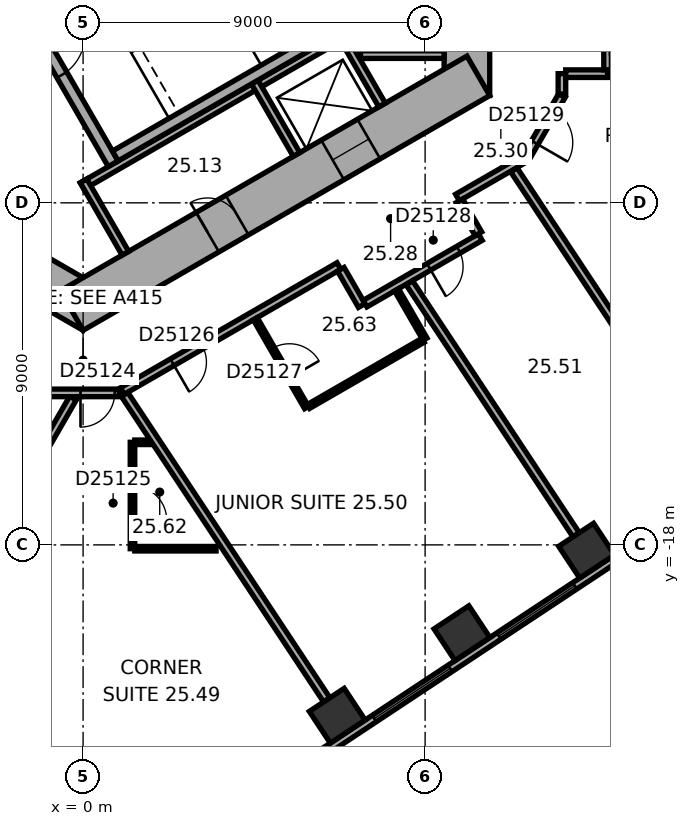
"""IFC4 building model, lengths in metres.
Left out: names, types, materials, properties, quantities, classifications, styles, units other than length and angle.
Written with IfcOpenShell. Run it as: python <this file> out.ifc"""

import sys

from ifc_helpers import new_model, si_unit, direction, frame, frame_2d, origin, origin_2d, place, context, subcontext, project, spatial, rectangle, extrude, element, fill, save


model = new_model("IFC4")
c1 = context("Model", 3, precision=1e-05, world=origin(), true_north=direction((0.0, 1.0)))
c2 = subcontext(c1, "Body", "Model", "MODEL_VIEW")
j1 = project(units=[si_unit("LENGTHUNIT", "METRE"), si_unit("PLANEANGLEUNIT", "RADIAN")], contexts=[c1])
p1 = place(None, origin())
s1 = spatial("IfcSite", under=j1, at=p1, CompositionType="ELEMENT")
p2 = place(p1, origin())
s2 = spatial("IfcBuilding", under=s1, at=p2, CompositionType="ELEMENT")
p3 = place(p2, frame((0.0, 0.0, 106.7)))
s3 = spatial("IfcBuildingStorey", under=s2, at=p3, CompositionType="ELEMENT", Elevation=106.7)
for number, where, z_axis, x_axis in (
    (1, (6.688, -22.496, 0.0), (0.0, 0.0, 1.0), (0.834, 0.552, 0.0)),
    (2, (9.969, -20.324, 0.0), (0.0, 0.0, 1.0), (0.834, 0.552, 0.0)),
    (3, (13.25, -18.152, 0.0), (0.0, 0.0, 1.0), (0.834, 0.552, 0.0)),
):
    element("IfcColumn", number, at=place(p3, frame(where, z_axis=z_axis, x_axis=x_axis)), inside=s3, PredefinedType="COLUMN", context=c2, shape_type="SweptSolid", body=[
        extrude(rectangle(XDim=1.1, YDim=1.0, at=origin_2d()), origin(), (0.0, 0.0, 1.0), 3.3),
    ])
p4 = place(p3, frame((10.1, -6.177, 0.0), z_axis=(0.0, 0.0, 1.0), x_axis=(0.0, 1.0, 0.0)))
e4 = element("IfcWall", 4, at=p4, inside=s3, PredefinedType="SHEAR", context=c2, shape_type="SweptSolid", body=[
    extrude(rectangle(XDim=12.355, YDim=1.2, at=frame_2d((6.177, 0.0))), origin(), (0.0, 0.0, 1.0), 3.3),
])
p5 = place(p4, frame((6.378, 0.0, 0.0)))
e5 = element("IfcOpeningElement", 5, at=p5, cuts=e4, PredefinedType="OPENING", context=c2, shape_type="SweptSolid", body=[
    extrude(rectangle(XDim=1.5, YDim=2.1, at=frame_2d((0.75, 1.05))), frame((0.0, 0.61, 0.0), z_axis=(0.0, -1.0, 0.0), x_axis=(1.0, 0.0, 0.0)), (0.0, 0.0, 1.0), 1.22),
])
p6 = place(p4, frame((1.828, 0.0, 0.0)))
e6 = element("IfcOpeningElement", 6, at=p6, cuts=e4, PredefinedType="OPENING", context=c2, shape_type="SweptSolid", body=[
    extrude(rectangle(XDim=1.1, YDim=2.1, at=frame_2d((0.55, 1.05))), frame((0.0, 0.61, 0.0), z_axis=(0.0, -1.0, 0.0), x_axis=(1.0, 0.0, 0.0)), (0.0, 0.0, 1.0), 1.22),
])
p7 = place(p4, frame((4.427, 0.0, 0.0)))
e7 = element("IfcOpeningElement", 7, at=p7, cuts=e4, PredefinedType="OPENING", context=c2, shape_type="SweptSolid", body=[
    extrude(rectangle(XDim=1.1, YDim=2.1, at=frame_2d((0.55, 1.05))), frame((0.0, 0.61, 0.0), z_axis=(0.0, -1.0, 0.0), x_axis=(1.0, 0.0, 0.0)), (0.0, 0.0, 1.0), 1.22),
])
p8 = place(p3, frame((-10.4, -5.658, 0.0), z_axis=(0.0, 0.0, 1.0), x_axis=(0.866021384402, -0.500006961711, 0.0)))
e8 = element("IfcWall", 8, at=p8, inside=s3, PredefinedType="SHEAR", context=c2, shape_type="SweptSolid", body=[
    extrude(rectangle(XDim=12.355, YDim=1.2, at=frame_2d((6.178, 0.0))), origin(), (0.0, 0.0, 1.0), 3.3),
])
p9 = place(p8, frame((6.378, 0.0, 0.0)))
e9 = element("IfcOpeningElement", 9, at=p9, cuts=e8, PredefinedType="OPENING", context=c2, shape_type="SweptSolid", body=[
    extrude(rectangle(XDim=1.5, YDim=2.1, at=frame_2d((0.75, 1.05))), frame((0.0, 0.61, 0.0), z_axis=(0.0, -1.0, 0.0), x_axis=(1.0, 0.0, 0.0)), (0.0, 0.0, 1.0), 1.22),
])
p10 = place(p8, frame((1.928, 0.0, 0.0)))
e10 = element("IfcOpeningElement", 10, at=p10, cuts=e8, PredefinedType="OPENING", context=c2, shape_type="SweptSolid", body=[
    extrude(rectangle(XDim=0.9, YDim=2.1, at=frame_2d((0.45, 1.05))), frame((0.0, 0.61, 0.0), z_axis=(0.0, -1.0, 0.0), x_axis=(1.0, 0.0, 0.0)), (0.0, 0.0, 1.0), 1.22),
])
p11 = place(p8, frame((4.528, 0.0, 0.0)))
e11 = element("IfcOpeningElement", 11, at=p11, cuts=e8, PredefinedType="OPENING", context=c2, shape_type="SweptSolid", body=[
    extrude(rectangle(XDim=0.9, YDim=2.1, at=frame_2d((0.45, 1.05))), frame((0.0, 0.61, 0.0), z_axis=(0.0, -1.0, 0.0), x_axis=(1.0, 0.0, 0.0)), (0.0, 0.0, 1.0), 1.22),
])
p12 = place(p3, frame((-0.3, -11.836, 0.0), z_axis=(0.0, 0.0, 1.0), x_axis=(0.866021384402, 0.500006961711, 0.0)))
e12 = element("IfcWall", 12, at=p12, inside=s3, PredefinedType="SHEAR", context=c2, shape_type="SweptSolid", body=[
    extrude(rectangle(XDim=12.355, YDim=1.2, at=frame_2d((6.178, 0.0))), origin(), (0.0, 0.0, 1.0), 3.3),
])
p13 = place(p12, frame((4.128, 0.0, 0.0)))
e13 = element("IfcOpeningElement", 13, at=p13, cuts=e12, PredefinedType="OPENING", context=c2, shape_type="SweptSolid", body=[
    extrude(rectangle(XDim=0.9, YDim=2.1, at=frame_2d((0.45, 1.05))), frame((0.0, 0.61, 0.0), z_axis=(0.0, -1.0, 0.0), x_axis=(1.0, 0.0, 0.0)), (0.0, 0.0, 1.0), 1.22),
])
p14 = place(p12, frame((7.928, 0.0, 0.0)))
e14 = element("IfcOpeningElement", 14, at=p14, cuts=e12, PredefinedType="OPENING", context=c2, shape_type="SweptSolid", body=[
    extrude(rectangle(XDim=1.1, YDim=2.1, at=frame_2d((0.55, 1.05))), frame((0.0, 0.61, 0.0), z_axis=(0.0, -1.0, 0.0), x_axis=(1.0, 0.0, 0.0)), (0.0, 0.0, 1.0), 1.22),
])
p15 = place(p3, frame((3.083, -25.601, 0.0), z_axis=(0.0, 0.0, 1.0), x_axis=(0.833884295743, 0.551939291329, 0.0)))
e15 = element("IfcWall", 15, at=p15, inside=s3, PredefinedType="STANDARD", context=c2, shape_type="SweptSolid", body=[
    extrude(rectangle(XDim=21.246, YDim=0.2, at=frame_2d((10.623, 0.0))), origin(), (0.0, 0.0, 1.0), 3.3),
])
p16 = place(p15, frame((1.553, 0.0, 0.8)))
e16 = element("IfcOpeningElement", 16, at=p16, cuts=e15, PredefinedType="OPENING", context=c2, shape_type="SweptSolid", body=[
    extrude(rectangle(XDim=2.4, YDim=1.7, at=frame_2d((1.2, 0.85))), frame((0.0, 0.11, 0.0), z_axis=(0.0, -1.0, 0.0), x_axis=(1.0, 0.0, 0.0)), (0.0, 0.0, 1.0), 0.22),
])
p17 = place(p15, frame((5.488, 0.0, 0.8)))
e17 = element("IfcOpeningElement", 17, at=p17, cuts=e15, PredefinedType="OPENING", context=c2, shape_type="SweptSolid", body=[
    extrude(rectangle(XDim=2.4, YDim=1.7, at=frame_2d((1.2, 0.85))), frame((0.0, 0.11, 0.0), z_axis=(0.0, -1.0, 0.0), x_axis=(1.0, 0.0, 0.0)), (0.0, 0.0, 1.0), 0.22),
])
p18 = place(p15, frame((9.422, 0.0, 0.8)))
e18 = element("IfcOpeningElement", 18, at=p18, cuts=e15, PredefinedType="OPENING", context=c2, shape_type="SweptSolid", body=[
    extrude(rectangle(XDim=2.4, YDim=1.7, at=frame_2d((1.2, 0.85))), frame((0.0, 0.11, 0.0), z_axis=(0.0, -1.0, 0.0), x_axis=(1.0, 0.0, 0.0)), (0.0, 0.0, 1.0), 0.22),
])
p19 = place(p15, frame((13.357, 0.0, 0.8)))
e19 = element("IfcOpeningElement", 19, at=p19, cuts=e15, PredefinedType="OPENING", context=c2, shape_type="SweptSolid", body=[
    extrude(rectangle(XDim=2.4, YDim=1.7, at=frame_2d((1.2, 0.85))), frame((0.0, 0.11, 0.0), z_axis=(0.0, -1.0, 0.0), x_axis=(1.0, 0.0, 0.0)), (0.0, 0.0, 1.0), 0.22),
])
p20 = place(p15, frame((17.291, 0.0, 0.8)))
e20 = element("IfcOpeningElement", 20, at=p20, cuts=e15, PredefinedType="OPENING", context=c2, shape_type="SweptSolid", body=[
    extrude(rectangle(XDim=2.4, YDim=1.7, at=frame_2d((1.2, 0.85))), frame((0.0, 0.11, 0.0), z_axis=(0.0, -1.0, 0.0), x_axis=(1.0, 0.0, 0.0)), (0.0, 0.0, 1.0), 0.22),
])
p21 = place(p3, frame((7.4, -5.2, 0.0), z_axis=(0.0, 0.0, 1.0), x_axis=(0.0, 1.0, 0.0)))
e21 = element("IfcWall", 21, at=p21, inside=s3, PredefinedType="PARTITIONING", context=c2, shape_type="SweptSolid", body=[
    extrude(rectangle(XDim=5.4, YDim=0.2, at=frame_2d((2.7, 0.0))), origin(), (0.0, 0.0, 1.0), 3.05),
])
p22 = place(p3, frame((7.3, -5.1, 0.0), z_axis=(0.0, 0.0, 1.0), x_axis=(1.0, 0.0, 0.0)))
e22 = element("IfcWall", 22, at=p22, inside=s3, PredefinedType="PARTITIONING", context=c2, shape_type="SweptSolid", body=[
    extrude(rectangle(XDim=2.2, YDim=0.2, at=frame_2d((1.1, 0.0))), origin(), (0.0, 0.0, 1.0), 3.05),
])
p23 = place(p3, frame((-0.024, -8.559, 0.0), z_axis=(0.0, 0.0, 1.0), x_axis=(0.866026010844, 0.49999894854, 0.0)))
e23 = element("IfcWall", 23, at=p23, inside=s3, PredefinedType="PARTITIONING", context=c2, shape_type="SweptSolid", body=[
    extrude(rectangle(XDim=8.0, YDim=0.2, at=frame_2d((4.0, 0.0))), origin(), (0.0, 0.0, 1.0), 3.05),
])
for number, where, z_axis, x_axis in (
    (24, (0.013, -8.422, 0.0), (0.0, 0.0, 1.0), (0.5, -0.866, 0.0)),
    (25, (4.516, -5.822, 0.0), (0.0, 0.0, 1.0), (0.5, -0.866, 0.0)),
    (26, (6.768, -4.522, 0.0), (0.0, 0.0, 1.0), (0.5, -0.866, 0.0)),
):
    element("IfcWall", number, at=place(p3, frame(where, z_axis=z_axis, x_axis=x_axis)), inside=s3, PredefinedType="PARTITIONING", context=c2, shape_type="SweptSolid", body=[
        extrude(rectangle(XDim=2.2, YDim=0.2, at=frame_2d((1.1, 0.0))), origin(), (0.0, 0.0, 1.0), 3.05),
    ])
p24 = place(p3, frame((-1.558, -3.902, 0.0), z_axis=(0.0, 0.0, 1.0), x_axis=(0.499977259774, -0.866038532462, 0.0)))
e27 = element("IfcWall", 27, at=p24, inside=s3, PredefinedType="SHEAR", context=c2, shape_type="SweptSolid", body=[
    extrude(rectangle(XDim=4.7, YDim=0.3, at=frame_2d((2.35, 0.0))), origin(), (0.0, 0.0, 1.0), 3.05),
])
p25 = place(p24, frame((0.8, 0.0, 0.0)))
e28 = element("IfcOpeningElement", 28, at=p25, cuts=e27, PredefinedType="OPENING", context=c2, shape_type="SweptSolid", body=[
    extrude(rectangle(XDim=1.2, YDim=2.1, at=frame_2d((0.6, 1.05))), frame((0.0, 0.16, 0.0), z_axis=(0.0, -1.0, 0.0), x_axis=(1.0, 0.0, 0.0)), (0.0, 0.0, 1.0), 0.32),
])
p26 = place(p3, frame((0.847, -7.767, 0.0), z_axis=(0.0, 0.0, 1.0), x_axis=(0.866027801685, 0.499995846692, 0.0)))
e29 = element("IfcWall", 29, at=p26, inside=s3, PredefinedType="SHEAR", context=c2, shape_type="SweptSolid", body=[
    extrude(rectangle(XDim=7.06, YDim=0.3, at=frame_2d((3.53, 0.0))), origin(), (0.0, 0.0, 1.0), 3.05),
])
p27 = place(p3, frame((-5.052, -22.429, 0.0), z_axis=(0.0, 0.0, 1.0), x_axis=(0.500004329283, 0.866022904257, 0.0)))
e30 = element("IfcWall", 30, at=p27, inside=s3, PredefinedType="PARTITIONING", context=c2, shape_type="SweptSolid", body=[
    extrude(rectangle(XDim=9.572, YDim=0.2, at=frame_2d((4.786, 0.0))), origin(), (0.0, 0.0, 1.0), 3.05),
])
p28 = place(p3, frame((-0.91, -14.001, 0.0), z_axis=(0.0, 0.0, 1.0), x_axis=(1.0, 0.0, 0.0)))
e31 = element("IfcWall", 31, at=p28, inside=s3, PredefinedType="PARTITIONING", context=c2, shape_type="SweptSolid", body=[
    extrude(rectangle(XDim=1.86, YDim=0.2, at=frame_2d((0.93, 0.0))), origin(), (0.0, 0.0, 1.0), 3.05),
])
p29 = place(p28, frame((0.842, 0.0, 0.0)))
e32 = element("IfcOpeningElement", 32, at=p29, cuts=e31, PredefinedType="OPENING", context=c2, shape_type="SweptSolid", body=[
    extrude(rectangle(XDim=0.9, YDim=2.1, at=frame_2d((0.45, 1.05))), frame((0.0, 0.11, 0.0), z_axis=(0.0, -1.0, 0.0), x_axis=(1.0, 0.0, 0.0)), (0.0, 0.0, 1.0), 0.22),
])
p30 = place(p3, frame((1.033, -13.953, 0.0), z_axis=(0.0, 0.0, 1.0), x_axis=(0.866017531406, 0.500013635111, 0.0)))
e33 = element("IfcWall", 33, at=p30, inside=s3, PredefinedType="PARTITIONING", context=c2, shape_type="SweptSolid", body=[
    extrude(rectangle(XDim=6.58, YDim=0.2, at=frame_2d((3.29, 0.0))), origin(), (0.0, 0.0, 1.0), 3.05),
])
p31 = place(p30, frame((1.515, 0.0, 0.0)))
e34 = element("IfcOpeningElement", 34, at=p31, cuts=e33, PredefinedType="OPENING", context=c2, shape_type="SweptSolid", body=[
    extrude(rectangle(XDim=0.9, YDim=2.1, at=frame_2d((0.45, 1.05))), frame((0.0, 0.11, 0.0), z_axis=(0.0, -1.0, 0.0), x_axis=(1.0, 0.0, 0.0)), (0.0, 0.0, 1.0), 0.22),
])
p32 = place(p3, frame((1.3, -18.101, 0.0), z_axis=(0.0, 0.0, 1.0), x_axis=(0.0, 1.0, 0.0)))
e35 = element("IfcWall", 35, at=p32, inside=s3, PredefinedType="PARTITIONING", context=c2, shape_type="SweptSolid", body=[
    extrude(rectangle(XDim=2.8, YDim=0.12, at=frame_2d((1.4, 0.0))), origin(), (0.0, 0.0, 1.0), 3.05),
])
p33 = place(p32, frame((0.75, 0.0, 0.0)))
e36 = element("IfcOpeningElement", 36, at=p33, cuts=e35, PredefinedType="OPENING", context=c2, shape_type="SweptSolid", body=[
    extrude(rectangle(XDim=0.9, YDim=2.1, at=frame_2d((0.45, 1.05))), frame((0.0, 0.07, 0.0), z_axis=(0.0, -1.0, 0.0), x_axis=(1.0, 0.0, 0.0)), (0.0, 0.0, 1.0), 0.14),
])
p34 = place(p3, frame((1.36, -15.301, 0.0), z_axis=(0.0, 0.0, 1.0), x_axis=(1.0, 0.0, 0.0)))
e37 = element("IfcWall", 37, at=p34, inside=s3, PredefinedType="PARTITIONING", context=c2, shape_type="SweptSolid", body=[
    extrude(rectangle(XDim=0.416, YDim=0.12, at=frame_2d((0.208, 0.0))), origin(), (0.0, 0.0, 1.0), 3.05),
])
p35 = place(p3, frame((3.5, -18.101, 0.0), z_axis=(0.0, 0.0, 1.0), x_axis=(-1.0, 0.0, 0.0)))
e38 = element("IfcWall", 38, at=p35, inside=s3, PredefinedType="PARTITIONING", context=c2, shape_type="SweptSolid", body=[
    extrude(rectangle(XDim=2.14, YDim=0.12, at=frame_2d((1.07, 0.0))), origin(), (0.0, 0.0, 1.0), 3.05),
])
p36 = place(p3, frame((5.881, -14.387, 0.0), z_axis=(0.0, 0.0, 1.0), x_axis=(-0.500048589285, 0.86599734893, 0.0)))
e39 = element("IfcWall", 39, at=p36, inside=s3, PredefinedType="PARTITIONING", context=c2, shape_type="SweptSolid", body=[
    extrude(rectangle(XDim=2.7, YDim=0.12, at=frame_2d((1.35, 0.0))), origin(), (0.0, 0.0, 1.0), 3.05),
])
p37 = place(p36, frame((0.9, 0.0, 0.0)))
e40 = element("IfcOpeningElement", 40, at=p37, cuts=e39, PredefinedType="OPENING", context=c2, shape_type="SweptSolid", body=[
    extrude(rectangle(XDim=0.9, YDim=2.1, at=frame_2d((0.45, 1.05))), frame((0.0, 0.07, 0.0), z_axis=(0.0, -1.0, 0.0), x_axis=(1.0, 0.0, 0.0)), (0.0, 0.0, 1.0), 0.14),
])
p38 = place(p3, frame((6.412, -22.079, 0.0), z_axis=(0.0, 0.0, 1.0), x_axis=(-0.551919507115, 0.83389739037, 0.0)))
e41 = element("IfcWall", 41, at=p38, inside=s3, PredefinedType="PARTITIONING", context=c2, shape_type="SweptSolid", body=[
    extrude(rectangle(XDim=9.635, YDim=0.2, at=frame_2d((4.817, 0.0))), origin(), (0.0, 0.0, 1.0), 3.05),
])
p39 = place(p3, frame((6.782, -10.749, 0.0), z_axis=(0.0, 0.0, 1.0), x_axis=(0.500074377092, -0.865982457891, 0.0)))
e42 = element("IfcWall", 42, at=p39, inside=s3, PredefinedType="PARTITIONING", context=c2, shape_type="SweptSolid", body=[
    extrude(rectangle(XDim=1.101, YDim=0.2, at=frame_2d((0.55, 0.0))), origin(), (0.0, 0.0, 1.0), 3.05),
])
p40 = place(p3, frame((7.419, -11.653, 0.0), z_axis=(0.0, 0.0, 1.0), x_axis=(0.866038154057, 0.49997791523, 0.0)))
e43 = element("IfcWall", 43, at=p40, inside=s3, PredefinedType="PARTITIONING", context=c2, shape_type="SweptSolid", body=[
    extrude(rectangle(XDim=3.502, YDim=0.2, at=frame_2d((1.751, 0.0))), origin(), (0.0, 0.0, 1.0), 3.05),
])
p41 = place(p40, frame((1.94, 0.0, 0.0)))
e44 = element("IfcOpeningElement", 44, at=p41, cuts=e43, PredefinedType="OPENING", context=c2, shape_type="SweptSolid", body=[
    extrude(rectangle(XDim=0.9, YDim=2.1, at=frame_2d((0.45, 1.05))), frame((0.0, 0.11, 0.0), z_axis=(0.0, -1.0, 0.0), x_axis=(1.0, 0.0, 0.0)), (0.0, 0.0, 1.0), 0.22),
])
p42 = place(p3, frame((8.249, -11.289, 0.0), z_axis=(0.0, 0.0, 1.0), x_axis=(0.499957405522, -0.866049994321, 0.0)))
e45 = element("IfcWall", 45, at=p42, inside=s3, PredefinedType="PARTITIONING", context=c2, shape_type="SweptSolid", body=[
    extrude(rectangle(XDim=1.499, YDim=0.12, at=frame_2d((0.75, 0.0))), origin(), (0.0, 0.0, 1.0), 3.05),
])
p43 = place(p3, frame((8.946, -12.617, 0.0), z_axis=(0.0, 0.0, 1.0), x_axis=(-0.865989304205, -0.500062521093, 0.0)))
e46 = element("IfcWall", 46, at=p43, inside=s3, PredefinedType="PARTITIONING", context=c2, shape_type="SweptSolid", body=[
    extrude(rectangle(XDim=3.48, YDim=0.12, at=frame_2d((1.74, 0.0))), origin(), (0.0, 0.0, 1.0), 3.05),
])
p44 = place(p3, frame((9.852, -8.861, 0.0), z_axis=(0.0, 0.0, 1.0), x_axis=(0.866013291437, 0.500020978615, 0.0)))
e47 = element("IfcWall", 47, at=p44, inside=s3, PredefinedType="PARTITIONING", context=c2, shape_type="SweptSolid", body=[
    extrude(rectangle(XDim=2.077, YDim=0.2, at=frame_2d((1.038, 0.0))), origin(), (0.0, 0.0, 1.0), 3.05),
])
p45 = place(p3, frame((10.402, -9.815, 0.0), z_axis=(0.0, 0.0, 1.0), x_axis=(-0.499968756647, 0.866043441391, 0.0)))
e48 = element("IfcWall", 48, at=p45, inside=s3, PredefinedType="PARTITIONING", context=c2, shape_type="SweptSolid", body=[
    extrude(rectangle(XDim=1.001, YDim=0.2, at=frame_2d((0.5, 0.0))), origin(), (0.0, 0.0, 1.0), 3.05),
])
p46 = place(p3, frame((11.67, -7.788, 0.0), z_axis=(0.0, 0.0, 1.0), x_axis=(0.500063286585, 0.865988862174, 0.0)))
e49 = element("IfcWall", 49, at=p46, inside=s3, PredefinedType="PARTITIONING", context=c2, shape_type="SweptSolid", body=[
    extrude(rectangle(XDim=1.86, YDim=0.2, at=frame_2d((0.93, 0.0))), origin(), (0.0, 0.0, 1.0), 3.05),
])
p47 = place(p46, frame((0.43, 0.0, 0.0)))
e50 = element("IfcOpeningElement", 50, at=p47, cuts=e49, PredefinedType="OPENING", context=c2, shape_type="SweptSolid", body=[
    extrude(rectangle(XDim=1.0, YDim=2.1, at=frame_2d((0.5, 1.05))), frame((0.0, 0.11, 0.0), z_axis=(0.0, -1.0, 0.0), x_axis=(1.0, 0.0, 0.0)), (0.0, 0.0, 1.0), 0.22),
])
p48 = place(p3, frame((12.6, -6.138, 0.0), z_axis=(0.0, 0.0, 1.0), x_axis=(0.0, 1.0, 0.0)))
e51 = element("IfcWall", 51, at=p48, inside=s3, PredefinedType="PARTITIONING", context=c2, shape_type="SweptSolid", body=[
    extrude(rectangle(XDim=0.537, YDim=0.2, at=frame_2d((0.268, 0.0))), origin(), (0.0, 0.0, 1.0), 3.05),
])
p49 = place(p3, frame((12.7, -5.601, 0.0), z_axis=(0.0, 0.0, 1.0), x_axis=(1.0, 0.0, 0.0)))
e52 = element("IfcWall", 52, at=p49, inside=s3, PredefinedType="PARTITIONING", context=c2, shape_type="SweptSolid", body=[
    extrude(rectangle(XDim=1.101, YDim=0.2, at=frame_2d((0.551, 0.0))), origin(), (0.0, 0.0, 1.0), 3.05),
])
p50 = place(p3, frame((12.974, -17.735, 0.0), z_axis=(0.0, 0.0, 1.0), x_axis=(-0.55192625685, 0.833892922982, 0.0)))
e53 = element("IfcWall", 53, at=p50, inside=s3, PredefinedType="PARTITIONING", context=c2, shape_type="SweptSolid", body=[
    extrude(rectangle(XDim=7.95, YDim=0.2, at=frame_2d((3.975, 0.0))), origin(), (0.0, 0.0, 1.0), 3.05),
])
p51 = place(p3, frame((13.801, -5.501, 0.0), z_axis=(0.0, 0.0, 1.0), x_axis=(0.0, 1.0, 0.0)))
e54 = element("IfcWall", 54, at=p51, inside=s3, PredefinedType="PARTITIONING", context=c2, shape_type="SweptSolid", body=[
    extrude(rectangle(XDim=5.702, YDim=0.2, at=frame_2d((2.851, 0.0))), origin(), (0.0, 0.0, 1.0), 3.05),
])
p52 = place(p51, frame((2.619, 0.0, 0.0)))
e55 = element("IfcOpeningElement", 55, at=p52, cuts=e54, PredefinedType="OPENING", context=c2, shape_type="SweptSolid", body=[
    extrude(rectangle(XDim=1.0, YDim=2.1, at=frame_2d((0.5, 1.05))), frame((0.0, 0.11, 0.0), z_axis=(0.0, -1.0, 0.0), x_axis=(1.0, 0.0, 0.0)), (0.0, 0.0, 1.0), 0.22),
])
p53 = place(p3, frame((16.255, -15.564, 0.0), z_axis=(0.0, 0.0, 1.0), x_axis=(-0.55192208744, 0.833895682562, 0.0)))
e56 = element("IfcWall", 56, at=p53, inside=s3, PredefinedType="PARTITIONING", context=c2, shape_type="SweptSolid", body=[
    extrude(rectangle(XDim=8.913, YDim=0.2, at=frame_2d((4.457, 0.0))), origin(), (0.0, 0.0, 1.0), 2.6),
])
p54 = place(p17, origin())
e57 = element("IfcWindow", 57, at=p54, inside=s3, PartitioningType="SINGLE_PANEL", PredefinedType="WINDOW", context=c2, shape_type="SweptSolid", body=[
    extrude(rectangle(XDim=2.4, YDim=1.7, at=frame_2d((1.2, 0.85))), frame((0.0, 0.03, 0.0), z_axis=(0.0, -1.0, 0.0), x_axis=(1.0, 0.0, 0.0)), (0.0, 0.0, 1.0), 0.06),
])
fill(e17, e57)
p55 = place(p18, origin())
e58 = element("IfcWindow", 58, at=p55, inside=s3, PartitioningType="SINGLE_PANEL", PredefinedType="WINDOW", context=c2, shape_type="SweptSolid", body=[
    extrude(rectangle(XDim=2.4, YDim=1.7, at=frame_2d((1.2, 0.85))), frame((0.0, 0.03, 0.0), z_axis=(0.0, -1.0, 0.0), x_axis=(1.0, 0.0, 0.0)), (0.0, 0.0, 1.0), 0.06),
])
fill(e18, e58)
p56 = place(p25, origin())
e59 = element("IfcDoor", 59, at=p56, inside=s3, OperationType="SINGLE_SWING_RIGHT", PredefinedType="DOOR", context=c2, shape_type="SweptSolid", body=[
    extrude(rectangle(XDim=1.2, YDim=2.1, at=frame_2d((0.6, 1.05))), frame((0.0, 0.025, 0.0), z_axis=(0.0, -1.0, 0.0), x_axis=(1.0, 0.0, 0.0)), (0.0, 0.0, 1.0), 0.05),
])
fill(e28, e59)
p57 = place(p13, origin())
e60 = element("IfcDoor", 60, at=p57, inside=s3, OperationType="SINGLE_SWING_LEFT", PredefinedType="DOOR", context=c2, shape_type="SweptSolid", body=[
    extrude(rectangle(XDim=0.9, YDim=2.1, at=frame_2d((0.45, 1.05))), frame((0.0, 0.025, 0.0), z_axis=(0.0, -1.0, 0.0), x_axis=(1.0, 0.0, 0.0)), (0.0, 0.0, 1.0), 0.05),
])
fill(e13, e60)
p58 = place(p14, origin())
e61 = element("IfcDoor", 61, at=p58, inside=s3, OperationType="DOUBLE_DOOR_SLIDING", PredefinedType="DOOR", context=c2, shape_type="SweptSolid", body=[
    extrude(rectangle(XDim=1.1, YDim=2.1, at=frame_2d((0.55, 1.05))), frame((0.0, 0.025, 0.0), z_axis=(0.0, -1.0, 0.0), x_axis=(1.0, 0.0, 0.0)), (0.0, 0.0, 1.0), 0.05),
])
fill(e14, e61)
p59 = place(p29, origin())
e62 = element("IfcDoor", 62, at=p59, inside=s3, OperationType="SINGLE_SWING_LEFT", PredefinedType="DOOR", context=c2, shape_type="SweptSolid", body=[
    extrude(rectangle(XDim=0.9, YDim=2.1, at=frame_2d((0.45, 1.05))), frame((0.0, 0.025, 0.0), z_axis=(0.0, -1.0, 0.0), x_axis=(1.0, 0.0, 0.0)), (0.0, 0.0, 1.0), 0.05),
])
fill(e32, e62)
p60 = place(p33, origin())
e63 = element("IfcDoor", 63, at=p60, inside=s3, OperationType="SINGLE_SWING_LEFT", PredefinedType="DOOR", context=c2, shape_type="SweptSolid", body=[
    extrude(rectangle(XDim=0.9, YDim=2.1, at=frame_2d((0.45, 1.05))), frame((0.0, 0.025, 0.0), z_axis=(0.0, -1.0, 0.0), x_axis=(1.0, 0.0, 0.0)), (0.0, 0.0, 1.0), 0.05),
])
fill(e36, e63)
p61 = place(p31, origin())
e64 = element("IfcDoor", 64, at=p61, inside=s3, OperationType="SINGLE_SWING_LEFT", PredefinedType="DOOR", context=c2, shape_type="SweptSolid", body=[
    extrude(rectangle(XDim=0.9, YDim=2.1, at=frame_2d((0.45, 1.05))), frame((0.0, 0.025, 0.0), z_axis=(0.0, -1.0, 0.0), x_axis=(1.0, 0.0, 0.0)), (0.0, 0.0, 1.0), 0.05),
])
fill(e34, e64)
p62 = place(p37, origin())
e65 = element("IfcDoor", 65, at=p62, inside=s3, OperationType="SINGLE_SWING_LEFT", PredefinedType="DOOR", context=c2, shape_type="SweptSolid", body=[
    extrude(rectangle(XDim=0.9, YDim=2.1, at=frame_2d((0.45, 1.05))), frame((0.0, 0.025, 0.0), z_axis=(0.0, -1.0, 0.0), x_axis=(1.0, 0.0, 0.0)), (0.0, 0.0, 1.0), 0.05),
])
fill(e40, e65)
p63 = place(p41, origin())
e66 = element("IfcDoor", 66, at=p63, inside=s3, OperationType="SINGLE_SWING_LEFT", PredefinedType="DOOR", context=c2, shape_type="SweptSolid", body=[
    extrude(rectangle(XDim=0.9, YDim=2.1, at=frame_2d((0.45, 1.05))), frame((0.0, 0.025, 0.0), z_axis=(0.0, -1.0, 0.0), x_axis=(1.0, 0.0, 0.0)), (0.0, 0.0, 1.0), 0.05),
])
fill(e44, e66)
p64 = place(p47, origin())
e67 = element("IfcDoor", 67, at=p64, inside=s3, OperationType="SINGLE_SWING_LEFT", PredefinedType="DOOR", context=c2, shape_type="SweptSolid", body=[
    extrude(rectangle(XDim=1.0, YDim=2.1, at=frame_2d((0.5, 1.05))), frame((0.0, 0.025, 0.0), z_axis=(0.0, -1.0, 0.0), x_axis=(1.0, 0.0, 0.0)), (0.0, 0.0, 1.0), 0.05),
])
fill(e50, e67)
save(model, sys.argv[1])
